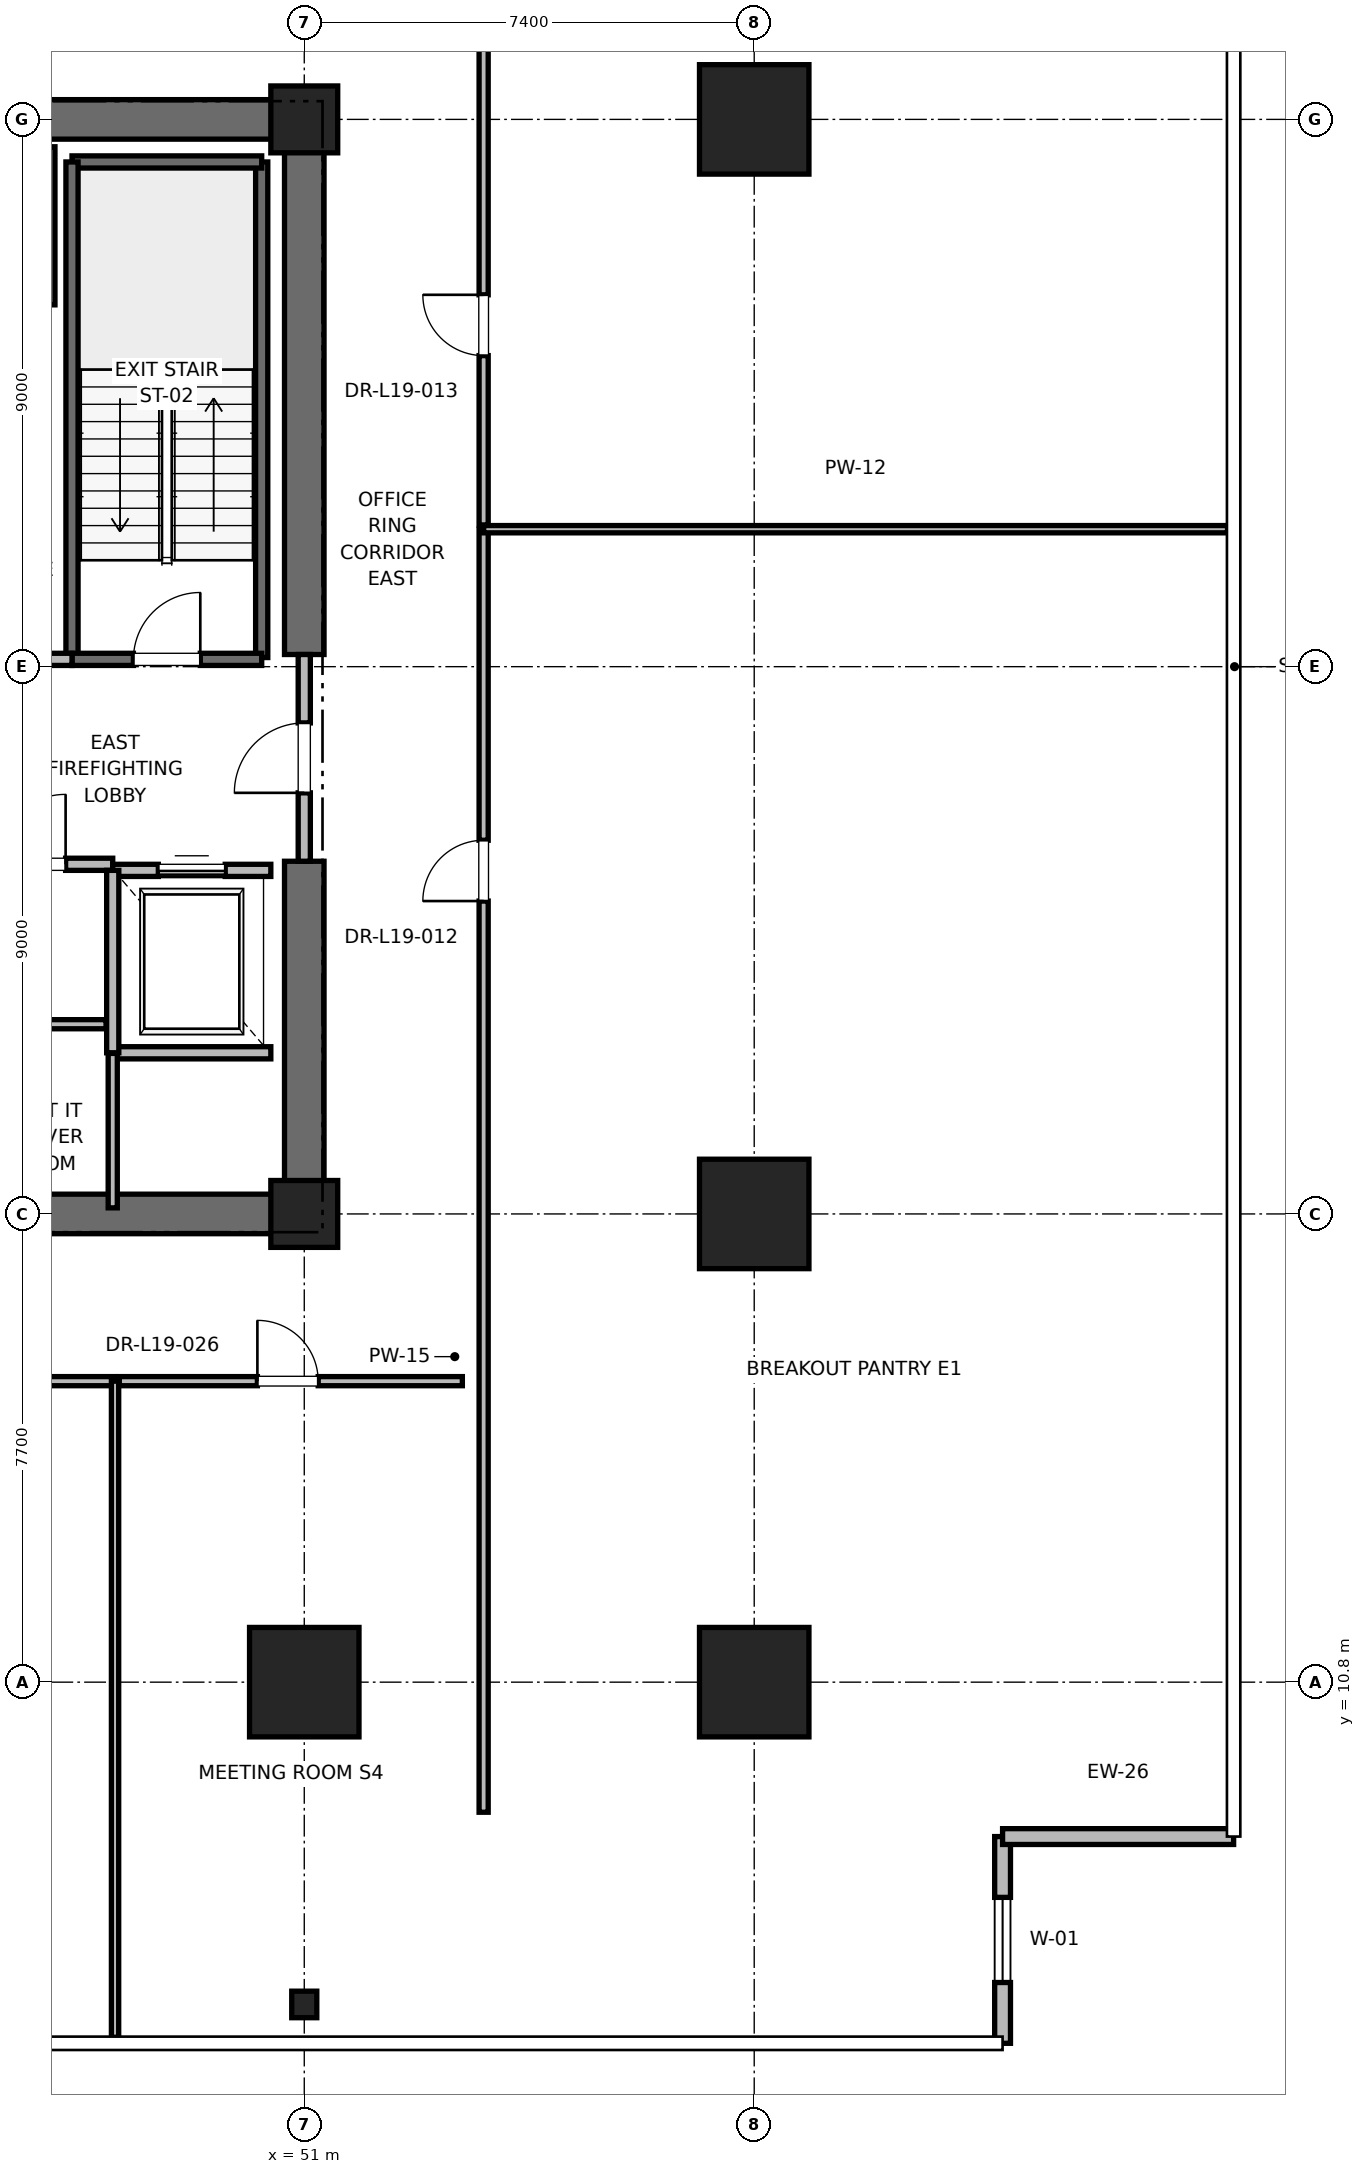
"""IFC4 building model, lengths in metres.
Left out: names, types, materials, properties, quantities, classifications, styles, units other than length and angle.
Written with IfcOpenShell. Run it as: python <this file> out.ifc"""

import sys

from ifc_helpers import new_model, si_unit, direction, frame, frame_2d, origin, origin_2d, place, context, subcontext, project, spatial, rectangle, i_section, extrude, element, fill, save


model = new_model("IFC4")
c1 = context("Model", 3, precision=1e-05, world=origin(), true_north=direction((0.0, 1.0)))
c2 = subcontext(c1, "Body", "Model", "MODEL_VIEW")
j1 = project(units=[si_unit("LENGTHUNIT", "METRE"), si_unit("PLANEANGLEUNIT", "RADIAN")], contexts=[c1])
p1 = place(None, origin())
s1 = spatial("IfcSite", under=j1, at=p1, CompositionType="ELEMENT")
p2 = place(p1, origin())
s2 = spatial("IfcBuilding", under=s1, at=p2, CompositionType="ELEMENT")
p3 = place(p2, frame((0.0, 0.0, 83.6)))
s3 = spatial("IfcBuildingStorey", under=s2, at=p3, CompositionType="ELEMENT", Elevation=83.6)
for number, where, z_axis, x_axis in (
    (1, (51.0, 10.8, 0.0), (0.0, 0.0, 1.0), (1.0, 0.0, 0.0)),
    (2, (58.4, 18.5, 0.0), (0.0, 0.0, 1.0), (1.0, 0.0, 0.0)),
    (3, (58.4, 36.5, 0.0), (0.0, 0.0, 1.0), (1.0, 0.0, 0.0)),
    (4, (58.4, 10.8, 0.0), (0.0, 0.0, 1.0), (1.0, 0.0, 0.0)),
):
    element("IfcColumn", number, at=place(p3, frame(where, z_axis=z_axis, x_axis=x_axis)), inside=s3, PredefinedType="COLUMN", context=c2, shape_type="SweptSolid", body=[
        extrude(rectangle(XDim=1.8, YDim=1.8, at=origin_2d()), origin(), (0.0, 0.0, 1.0), 4.0),
    ])
p4 = place(p3, frame((51.0, 5.5, 0.0), z_axis=(0.0, 0.0, 1.0), x_axis=(1.0, 0.0, 0.0)))
e5 = element("IfcColumn", 5, at=p4, inside=s3, PredefinedType="COLUMN", context=c2, shape_type="SweptSolid", body=[
    extrude(i_section(OverallWidth=0.412, OverallDepth=0.437, WebThickness=0.036, FlangeThickness=0.058, FilletRadius=0.015, at=origin_2d()), origin(), (0.0, 0.0, 1.0), 4.0),
])
for number, where, z_axis, x_axis in (
    (6, (51.0, 18.5, 0.0), (0.0, 0.0, 1.0), (1.0, 0.0, 0.0)),
    (7, (51.0, 36.5, 0.0), (0.0, 0.0, 1.0), (1.0, 0.0, 0.0)),
):
    element("IfcColumn", number, at=place(p3, frame(where, z_axis=z_axis, x_axis=x_axis)), inside=s3, PredefinedType="PILASTER", context=c2, shape_type="SweptSolid", body=[
        extrude(rectangle(XDim=1.1, YDim=1.1, at=origin_2d()), origin(), (0.0, 0.0, 1.0), 4.0),
    ])
p5 = place(p3, frame((41.8, 18.5, 0.0), z_axis=(0.0, 0.0, 1.0), x_axis=(1.0, 0.0, 0.0)))
e8 = element("IfcWall", 8, at=p5, inside=s3, PredefinedType="SHEAR", context=c2, shape_type="SweptSolid", body=[
    extrude(rectangle(XDim=9.2, YDim=0.65, at=frame_2d((4.6, 0.0))), origin(), (0.0, 0.0, 1.0), 3.76),
])
for number, where, z_axis, x_axis in (
    (9, (45.2, 36.5, 0.0), (0.0, 0.0, 1.0), (1.0, 0.0, 0.0)),
    (10, (51.0, 18.5, 0.0), (0.0, 0.0, 1.0), (0.0, 1.0, 0.0)),
):
    element("IfcWall", number, at=place(p3, frame(where, z_axis=z_axis, x_axis=x_axis)), inside=s3, PredefinedType="SHEAR", context=c2, shape_type="SweptSolid", body=[
        extrude(rectangle(XDim=5.8, YDim=0.65, at=frame_2d((2.9, 0.0))), origin(), (0.0, 0.0, 1.0), 3.76),
    ])
p6 = place(p3, frame((51.0, 27.7, 0.0), z_axis=(0.0, 0.0, 1.0), x_axis=(0.0, 1.0, 0.0)))
e11 = element("IfcWall", 11, at=p6, inside=s3, PredefinedType="SHEAR", context=c2, shape_type="SweptSolid", body=[
    extrude(rectangle(XDim=8.8, YDim=0.65, at=frame_2d((4.4, 0.0))), origin(), (0.0, 0.0, 1.0), 3.76),
])
p7 = place(p3, frame((62.485, 4.861, 0.0), z_axis=(0.0, 0.0, 1.0), x_axis=(0.0, 1.0, 0.0)))
e12 = element("IfcWall", 12, at=p7, inside=s3, PredefinedType="PARAPET", context=c2, shape_type="SweptSolid", body=[
    extrude(rectangle(XDim=3.4, YDim=0.26, at=frame_2d((1.7, 0.0))), origin(), (0.0, 0.0, 1.0), 3.76),
])
p8 = place(p7, frame((1.0, 0.0, 0.85)))
e13 = element("IfcOpeningElement", 13, at=p8, cuts=e12, PredefinedType="OPENING", context=c2, shape_type="SweptSolid", body=[
    extrude(rectangle(XDim=1.4, YDim=2.0, at=frame_2d((0.7, 1.0))), frame((0.0, 0.13, 0.0), z_axis=(0.0, -1.0, 0.0), x_axis=(1.0, 0.0, 0.0)), (0.0, 0.0, 1.0), 0.26),
])
p9 = place(p3, frame((62.485, 8.261, 0.0), z_axis=(0.0, 0.0, 1.0), x_axis=(1.0, 0.0, 0.0)))
e14 = element("IfcWall", 14, at=p9, inside=s3, PredefinedType="PARAPET", context=c2, shape_type="SweptSolid", body=[
    extrude(rectangle(XDim=3.8, YDim=0.26, at=frame_2d((1.9, 0.0))), origin(), (0.0, 0.0, 1.0), 3.76),
])
p10 = place(p3, frame((50.3, 27.65, 0.0), z_axis=(0.0, 0.0, 1.0), x_axis=(0.0, 1.0, 0.0)))
e15 = element("IfcWall", 15, at=p10, inside=s3, PredefinedType="SOLIDWALL", context=c2, shape_type="SweptSolid", body=[
    extrude(rectangle(XDim=8.15, YDim=0.2, at=frame_2d((4.075, 0.0))), origin(), (0.0, 0.0, 1.0), 3.76),
])
p11 = place(p3, frame((47.18, 35.8, 0.0), z_axis=(0.0, 0.0, 1.0), x_axis=(1.0, 0.0, 0.0)))
e16 = element("IfcWall", 16, at=p11, inside=s3, PredefinedType="SOLIDWALL", context=c2, shape_type="SweptSolid", body=[
    extrude(rectangle(XDim=3.12, YDim=0.2, at=frame_2d((1.56, 0.0))), origin(), (0.0, 0.0, 1.0), 3.76),
])
p12 = place(p3, frame((47.18, 27.62, 0.0), z_axis=(0.0, 0.0, 1.0), x_axis=(0.0, 1.0, 0.0)))
e17 = element("IfcWall", 17, at=p12, inside=s3, PredefinedType="SOLIDWALL", context=c2, shape_type="SweptSolid", body=[
    extrude(rectangle(XDim=8.18, YDim=0.2, at=frame_2d((4.09, 0.0))), origin(), (0.0, 0.0, 1.0), 3.76),
])
p13 = place(p3, frame((47.18, 27.62, 0.0), z_axis=(0.0, 0.0, 1.0), x_axis=(1.0, 0.0, 0.0)))
e18 = element("IfcWall", 18, at=p13, inside=s3, PredefinedType="SOLIDWALL", context=c2, shape_type="SweptSolid", body=[
    extrude(rectangle(XDim=3.12, YDim=0.2, at=frame_2d((1.56, 0.0))), origin(), (0.0, 0.0, 1.0), 3.76),
])
p14 = place(p13, frame((1.01, 0.0, 0.0)))
e19 = element("IfcOpeningElement", 19, at=p14, cuts=e18, PredefinedType="OPENING", context=c2, shape_type="SweptSolid", body=[
    extrude(rectangle(XDim=1.1, YDim=2.15, at=frame_2d((0.55, 1.075))), frame((0.0, 0.1, 0.0), z_axis=(0.0, -1.0, 0.0), x_axis=(1.0, 0.0, 0.0)), (0.0, 0.0, 1.0), 0.2),
])
p15 = place(p3, frame((45.15, 24.25, 0.0), z_axis=(0.0, 0.0, 1.0), x_axis=(1.0, 0.0, 0.0)))
e20 = element("IfcWall", 20, at=p15, inside=s3, PredefinedType="PARTITIONING", context=c2, shape_type="SweptSolid", body=[
    extrude(rectangle(XDim=2.7, YDim=0.2, at=frame_2d((1.35, 0.0))), origin(), (0.0, 0.0, 1.0), 3.76),
])
p16 = place(p15, frame((0.775, 0.0, 0.0)))
e21 = element("IfcOpeningElement", 21, at=p16, cuts=e20, PredefinedType="OPENING", context=c2, shape_type="SweptSolid", body=[
    extrude(rectangle(XDim=1.15, YDim=2.2, at=frame_2d((0.575, 1.1))), frame((0.0, 0.1, 0.0), z_axis=(0.0, -1.0, 0.0), x_axis=(1.0, 0.0, 0.0)), (0.0, 0.0, 1.0), 0.2),
])
p17 = place(p3, frame((45.15, 27.62, 0.0), z_axis=(0.0, 0.0, 1.0), x_axis=(1.0, 0.0, 0.0)))
e22 = element("IfcWall", 22, at=p17, inside=s3, PredefinedType="PARTITIONING", context=c2, shape_type="SweptSolid", body=[
    extrude(rectangle(XDim=2.03, YDim=0.2, at=frame_2d((1.015, 0.0))), origin(), (0.0, 0.0, 1.0), 3.76),
])
p18 = place(p17, frame((0.44, 0.0, 0.0)))
e23 = element("IfcOpeningElement", 23, at=p18, cuts=e22, PredefinedType="OPENING", context=c2, shape_type="SweptSolid", body=[
    extrude(rectangle(XDim=1.15, YDim=2.2, at=frame_2d((0.575, 1.1))), frame((0.0, 0.1, 0.0), z_axis=(0.0, -1.0, 0.0), x_axis=(1.0, 0.0, 0.0)), (0.0, 0.0, 1.0), 0.2),
])
p19 = place(p3, frame((51.0, 24.3, 0.0), z_axis=(0.0, 0.0, 1.0), x_axis=(0.0, 1.0, 0.0)))
e24 = element("IfcWall", 24, at=p19, inside=s3, PredefinedType="PARTITIONING", context=c2, shape_type="SweptSolid", body=[
    extrude(rectangle(XDim=3.4, YDim=0.2, at=frame_2d((1.7, 0.0))), origin(), (0.0, 0.0, 1.0), 2.54),
])
p20 = place(p19, frame((1.125, 0.0, 0.0)))
e25 = element("IfcOpeningElement", 25, at=p20, cuts=e24, PredefinedType="OPENING", context=c2, shape_type="SweptSolid", body=[
    extrude(rectangle(XDim=1.15, YDim=2.2, at=frame_2d((0.575, 1.1))), frame((0.0, 0.1, 0.0), z_axis=(0.0, -1.0, 0.0), x_axis=(1.0, 0.0, 0.0)), (0.0, 0.0, 1.0), 0.2),
])
p21 = place(p3, frame((47.85, 21.15, 0.0), z_axis=(0.0, 0.0, 1.0), x_axis=(1.0, 0.0, 0.0)))
e26 = element("IfcWall", 26, at=p21, inside=s3, PredefinedType="SOLIDWALL", context=c2, shape_type="SweptSolid", body=[
    extrude(rectangle(XDim=2.6, YDim=0.2, at=frame_2d((1.3, 0.0))), origin(), (0.0, 0.0, 1.0), 3.76),
])
p22 = place(p3, frame((50.45, 24.15, 0.0), z_axis=(0.0, 0.0, 1.0), x_axis=(-1.0, 0.0, 0.0)))
e27 = element("IfcWall", 27, at=p22, inside=s3, PredefinedType="SOLIDWALL", context=c2, shape_type="SweptSolid", body=[
    extrude(rectangle(XDim=2.6, YDim=0.2, at=frame_2d((1.3, 0.0))), origin(), (0.0, 0.0, 1.0), 2.54),
])
p23 = place(p22, frame((0.75, 0.0, 0.0)))
e28 = element("IfcOpeningElement", 28, at=p23, cuts=e27, PredefinedType="OPENING", context=c2, shape_type="SweptSolid", body=[
    extrude(rectangle(XDim=1.1, YDim=2.2, at=frame_2d((0.55, 1.1))), frame((0.0, 0.1, 0.0), z_axis=(0.0, -1.0, 0.0), x_axis=(1.0, 0.0, 0.0)), (0.0, 0.0, 1.0), 0.2),
])
p24 = place(p3, frame((47.85, 24.15, 0.0), z_axis=(0.0, 0.0, 1.0), x_axis=(0.0, -1.0, 0.0)))
e29 = element("IfcWall", 29, at=p24, inside=s3, PredefinedType="SOLIDWALL", context=c2, shape_type="SweptSolid", body=[
    extrude(rectangle(XDim=3.0, YDim=0.2, at=frame_2d((1.5, 0.0))), origin(), (0.0, 0.0, 1.0), 3.76),
])
p25 = place(p3, frame((46.8, 33.45, 0.0), z_axis=(0.0, 0.0, 1.0), x_axis=(0.0, 1.0, 0.0)))
e30 = element("IfcWall", 30, at=p25, inside=s3, PredefinedType="SOLIDWALL", context=c2, shape_type="SweptSolid", body=[
    extrude(rectangle(XDim=2.6, YDim=0.2, at=frame_2d((1.3, 0.0))), origin(), (0.0, 0.0, 1.0), 3.76),
])
p26 = place(p3, frame((47.85, 18.6, 0.0), z_axis=(0.0, 0.0, 1.0), x_axis=(0.0, 1.0, 0.0)))
e31 = element("IfcWall", 31, at=p26, inside=s3, PredefinedType="PARTITIONING", context=c2, shape_type="SweptSolid", body=[
    extrude(rectangle(XDim=2.54, YDim=0.15, at=frame_2d((1.27, 0.0))), origin(), (0.0, 0.0, 1.0), 2.85),
])
p27 = place(p3, frame((44.8, 21.62, 0.0), z_axis=(0.0, 0.0, 1.0), x_axis=(1.0, 0.0, 0.0)))
e32 = element("IfcWall", 32, at=p27, inside=s3, PredefinedType="PARTITIONING", context=c2, shape_type="SweptSolid", body=[
    extrude(rectangle(XDim=2.94, YDim=0.15, at=frame_2d((1.47, 0.0))), origin(), (0.0, 0.0, 1.0), 2.85),
])
p28 = place(p27, frame((0.97, 0.0, 0.0)))
e33 = element("IfcOpeningElement", 33, at=p28, cuts=e32, PredefinedType="OPENING", context=c2, shape_type="SweptSolid", body=[
    extrude(rectangle(XDim=1.0, YDim=2.15, at=frame_2d((0.5, 1.075))), frame((0.0, 0.075, 0.0), z_axis=(0.0, -1.0, 0.0), x_axis=(1.0, 0.0, 0.0)), (0.0, 0.0, 1.0), 0.15),
])
p29 = place(p3, frame((41.43, 15.75, 0.0), z_axis=(0.0, 0.0, 1.0), x_axis=(1.0, 0.0, 0.0)))
e34 = element("IfcWall", 34, at=p29, inside=s3, PredefinedType="PARTITIONING", context=c2, shape_type="SweptSolid", body=[
    extrude(rectangle(XDim=6.458, YDim=0.15, at=frame_2d((3.229, 0.0))), origin(), (0.0, 0.0, 1.0), 2.85),
])
p30 = place(p29, frame((2.444, 0.0, 0.0)))
e35 = element("IfcOpeningElement", 35, at=p30, cuts=e34, PredefinedType="OPENING", context=c2, shape_type="SweptSolid", body=[
    extrude(rectangle(XDim=1.5, YDim=2.25, at=frame_2d((0.75, 1.125))), frame((0.0, 0.075, 0.0), z_axis=(0.0, -1.0, 0.0), x_axis=(1.0, 0.0, 0.0)), (0.0, 0.0, 1.0), 0.15),
])
p31 = place(p3, frame((47.888, 4.961, 0.0), z_axis=(0.0, 0.0, 1.0), x_axis=(0.0, 1.0, 0.0)))
e36 = element("IfcWall", 36, at=p31, inside=s3, PredefinedType="PARTITIONING", context=c2, shape_type="SweptSolid", body=[
    extrude(rectangle(XDim=10.789, YDim=0.12, at=frame_2d((5.395, 0.0))), origin(), (0.0, 0.0, 1.0), 2.39),
])
p32 = place(p3, frame((47.958, 15.75, 0.0), z_axis=(0.0, 0.0, 1.0), x_axis=(1.0, 0.0, 0.0)))
e37 = element("IfcWall", 37, at=p32, inside=s3, PredefinedType="PARTITIONING", context=c2, shape_type="SweptSolid", body=[
    extrude(rectangle(XDim=5.642, YDim=0.15, at=frame_2d((2.821, 0.0))), origin(), (0.0, 0.0, 1.0), 2.85),
])
p33 = place(p32, frame((2.271, 0.0, 0.0)))
e38 = element("IfcOpeningElement", 38, at=p33, cuts=e37, PredefinedType="OPENING", context=c2, shape_type="SweptSolid", body=[
    extrude(rectangle(XDim=1.0, YDim=2.15, at=frame_2d((0.5, 1.075))), frame((0.0, 0.075, 0.0), z_axis=(0.0, -1.0, 0.0), x_axis=(1.0, 0.0, 0.0)), (0.0, 0.0, 1.0), 0.15),
])
p34 = place(p3, frame((53.95, 8.661, 0.0), z_axis=(0.0, 0.0, 1.0), x_axis=(0.0, 1.0, 0.0)))
e39 = element("IfcWall", 39, at=p34, inside=s3, PredefinedType="PARTITIONING", context=c2, shape_type="SweptSolid", body=[
    extrude(rectangle(XDim=21.1, YDim=0.15, at=frame_2d((10.55, 0.0))), origin(), (0.0, 0.0, 1.0), 2.85),
])
p35 = place(p34, frame((14.985, 0.0, 0.0)))
e40 = element("IfcOpeningElement", 40, at=p35, cuts=e39, PredefinedType="OPENING", context=c2, shape_type="SweptSolid", body=[
    extrude(rectangle(XDim=1.0, YDim=2.15, at=frame_2d((0.5, 1.075))), frame((0.0, 0.075, 0.0), z_axis=(0.0, -1.0, 0.0), x_axis=(1.0, 0.0, 0.0)), (0.0, 0.0, 1.0), 0.15),
])
p36 = place(p3, frame((53.95, 29.761, 0.0), z_axis=(0.0, 0.0, 1.0), x_axis=(1.0, 0.0, 0.0)))
e41 = element("IfcWall", 41, at=p36, inside=s3, PredefinedType="PARTITIONING", context=c2, shape_type="SweptSolid", body=[
    extrude(rectangle(XDim=12.235, YDim=0.12, at=frame_2d((6.117, 0.0))), origin(), (0.0, 0.0, 1.0), 2.85),
])
p37 = place(p3, frame((53.95, 29.831, 0.0), z_axis=(0.0, 0.0, 1.0), x_axis=(0.0, 1.0, 0.0)))
e42 = element("IfcWall", 42, at=p37, inside=s3, PredefinedType="PARTITIONING", context=c2, shape_type="SweptSolid", body=[
    extrude(rectangle(XDim=16.508, YDim=0.15, at=frame_2d((8.254, 0.0))), origin(), (0.0, 0.0, 1.0), 2.85),
])
p38 = place(p37, frame((2.785, 0.0, 0.0)))
e43 = element("IfcOpeningElement", 43, at=p38, cuts=e42, PredefinedType="OPENING", context=c2, shape_type="SweptSolid", body=[
    extrude(rectangle(XDim=1.0, YDim=2.15, at=frame_2d((0.5, 1.075))), frame((0.0, 0.075, 0.0), z_axis=(0.0, -1.0, 0.0), x_axis=(1.0, 0.0, 0.0)), (0.0, 0.0, 1.0), 0.15),
])
p39 = place(p8, origin())
e44 = element("IfcWindow", 44, at=p39, inside=s3, PartitioningType="SINGLE_PANEL", PredefinedType="WINDOW", context=c2, shape_type="SweptSolid", body=[
    extrude(rectangle(XDim=1.4, YDim=2.0, at=frame_2d((0.7, 1.0))), frame((0.0, 0.03, 0.0), z_axis=(0.0, -1.0, 0.0), x_axis=(1.0, 0.0, 0.0)), (0.0, 0.0, 1.0), 0.06),
])
fill(e13, e44)
p40 = place(p14, origin())
e45 = element("IfcDoor", 45, at=p40, inside=s3, OperationType="SINGLE_SWING_RIGHT", PredefinedType="DOOR", context=c2, shape_type="SweptSolid", body=[
    extrude(rectangle(XDim=1.1, YDim=2.15, at=frame_2d((0.55, 1.075))), frame((0.0, 0.025, 0.0), z_axis=(0.0, -1.0, 0.0), x_axis=(1.0, 0.0, 0.0)), (0.0, 0.0, 1.0), 0.05),
])
fill(e19, e45)
p41 = place(p16, origin())
e46 = element("IfcDoor", 46, at=p41, inside=s3, OperationType="SINGLE_SWING_RIGHT", PredefinedType="DOOR", context=c2, shape_type="SweptSolid", body=[
    extrude(rectangle(XDim=1.15, YDim=2.2, at=frame_2d((0.575, 1.1))), frame((0.0, 0.025, 0.0), z_axis=(0.0, -1.0, 0.0), x_axis=(1.0, 0.0, 0.0)), (0.0, 0.0, 1.0), 0.05),
])
fill(e21, e46)
p42 = place(p20, origin())
e47 = element("IfcDoor", 47, at=p42, inside=s3, OperationType="SINGLE_SWING_LEFT", PredefinedType="DOOR", context=c2, shape_type="SweptSolid", body=[
    extrude(rectangle(XDim=1.15, YDim=2.2, at=frame_2d((0.575, 1.1))), frame((0.0, 0.025, 0.0), z_axis=(0.0, -1.0, 0.0), x_axis=(1.0, 0.0, 0.0)), (0.0, 0.0, 1.0), 0.05),
])
fill(e25, e47)
p43 = place(p23, origin())
e48 = element("IfcDoor", 48, at=p43, inside=s3, OperationType="SLIDING_TO_RIGHT", PredefinedType="DOOR", context=c2, shape_type="SweptSolid", body=[
    extrude(rectangle(XDim=1.1, YDim=2.2, at=frame_2d((0.55, 1.1))), frame((0.0, 0.025, 0.0), z_axis=(0.0, -1.0, 0.0), x_axis=(1.0, 0.0, 0.0)), (0.0, 0.0, 1.0), 0.05),
])
fill(e28, e48)
p44 = place(p33, origin())
e49 = element("IfcDoor", 49, at=p44, inside=s3, OperationType="SINGLE_SWING_LEFT", PredefinedType="DOOR", context=c2, shape_type="SweptSolid", body=[
    extrude(rectangle(XDim=1.0, YDim=2.15, at=frame_2d((0.5, 1.075))), frame((0.0, 0.025, 0.0), z_axis=(0.0, -1.0, 0.0), x_axis=(1.0, 0.0, 0.0)), (0.0, 0.0, 1.0), 0.05),
])
fill(e38, e49)
p45 = place(p35, origin())
e50 = element("IfcDoor", 50, at=p45, inside=s3, OperationType="SINGLE_SWING_LEFT", PredefinedType="DOOR", context=c2, shape_type="SweptSolid", body=[
    extrude(rectangle(XDim=1.0, YDim=2.15, at=frame_2d((0.5, 1.075))), frame((0.0, 0.025, 0.0), z_axis=(0.0, -1.0, 0.0), x_axis=(1.0, 0.0, 0.0)), (0.0, 0.0, 1.0), 0.05),
])
fill(e40, e50)
p46 = place(p38, origin())
e51 = element("IfcDoor", 51, at=p46, inside=s3, OperationType="SINGLE_SWING_RIGHT", PredefinedType="DOOR", context=c2, shape_type="SweptSolid", body=[
    extrude(rectangle(XDim=1.0, YDim=2.15, at=frame_2d((0.5, 1.075))), frame((0.0, 0.025, 0.0), z_axis=(0.0, -1.0, 0.0), x_axis=(1.0, 0.0, 0.0)), (0.0, 0.0, 1.0), 0.05),
])
fill(e43, e51)
save(model, sys.argv[1])
